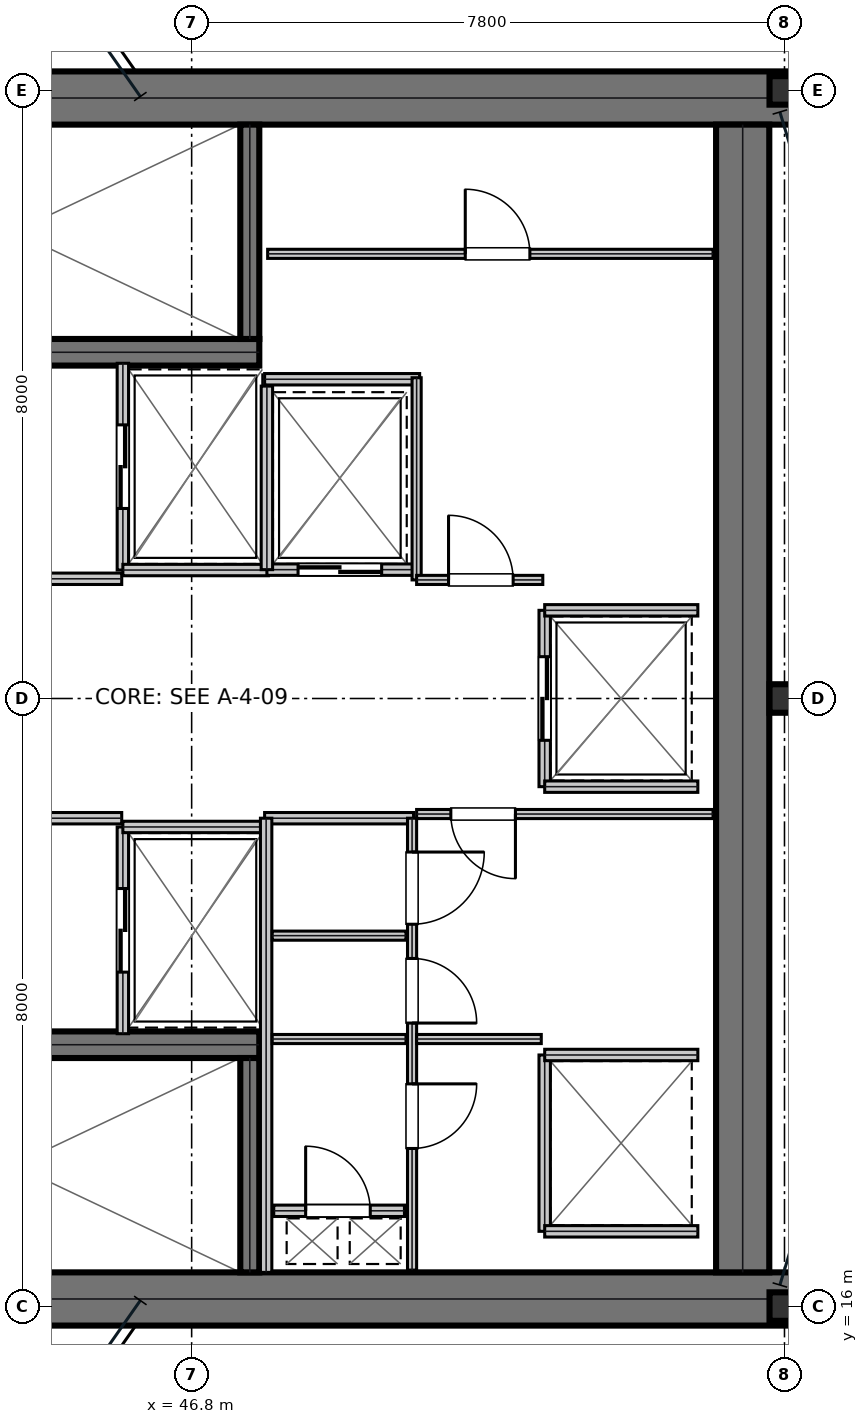
"""IFC4 building model, lengths in metres.
Left out: names, types, materials, properties, quantities, classifications, styles, units other than length and angle.
Written with IfcOpenShell. Run it as: python <this file> out.ifc"""

import sys

from ifc_helpers import new_model, si_unit, direction, frame, frame_2d, origin, origin_2d, place, context, subcontext, project, spatial, rectangle, i_section, extrude, element, fill, save


model = new_model("IFC4")
c1 = context("Model", 3, precision=1e-05, world=origin(), true_north=direction((0.0, 1.0)))
c2 = subcontext(c1, "Body", "Model", "MODEL_VIEW")
j1 = project(units=[si_unit("LENGTHUNIT", "METRE"), si_unit("PLANEANGLEUNIT", "RADIAN")], contexts=[c1])
p1 = place(None, origin())
s1 = spatial("IfcSite", under=j1, at=p1, CompositionType="ELEMENT")
p2 = place(p1, origin())
s2 = spatial("IfcBuilding", under=s1, at=p2, CompositionType="ELEMENT")
p3 = place(p2, frame((0.0, 0.0, 216.15)))
s3 = spatial("IfcBuildingStorey", under=s2, at=p3, CompositionType="ELEMENT", Elevation=216.15)
for number, where, z_axis, x_axis in (
    (1, (38.8, 31.9, 0.0), (0.0, 0.0, 1.0), (1.0, 0.0, 0.0)),
    (2, (38.8, 16.1, 0.0), (0.0, 0.0, 1.0), (1.0, 0.0, 0.0)),
):
    element("IfcWall", number, at=place(p3, frame(where, z_axis=z_axis, x_axis=x_axis)), inside=s3, PredefinedType="SHEAR", context=c2, shape_type="SweptSolid", body=[
        extrude(rectangle(XDim=16.0, YDim=0.7, at=frame_2d((8.0, 0.0))), origin(), (0.0, 0.0, 1.0), 3.79),
    ])
p4 = place(p3, frame((54.05, 16.45, 0.0), z_axis=(0.0, 0.0, 1.0), x_axis=(0.0, 1.0, 0.0)))
e3 = element("IfcWall", 3, at=p4, inside=s3, PredefinedType="SHEAR", context=c2, shape_type="SweptSolid", body=[
    extrude(rectangle(XDim=15.1, YDim=0.7, at=frame_2d((7.55, 0.0))), origin(), (0.0, 0.0, 1.0), 3.79),
])
p5 = place(p3, frame((39.98, 28.555, 0.0), z_axis=(0.0, 0.0, 1.0), x_axis=(1.0, 0.0, 0.0)))
e4 = element("IfcWall", 4, at=p5, inside=s3, PredefinedType="SHEAR", context=c2, shape_type="SweptSolid", body=[
    extrude(rectangle(XDim=7.71, YDim=0.35, at=frame_2d((3.855, 0.0))), origin(), (0.0, 0.0, 1.0), 3.79),
])
p6 = place(p5, frame((0.25, 0.0, 0.0)))
e5 = element("IfcOpeningElement", 5, at=p6, cuts=e4, PredefinedType="OPENING", context=c2, shape_type="SweptSolid", body=[
    extrude(rectangle(XDim=1.1, YDim=2.15, at=frame_2d((0.55, 1.075))), frame((0.0, 0.185, 0.0), z_axis=(0.0, -1.0, 0.0), x_axis=(1.0, 0.0, 0.0)), (0.0, 0.0, 1.0), 0.37),
])
p7 = place(p3, frame((39.98, 19.445, 0.0), z_axis=(0.0, 0.0, 1.0), x_axis=(1.0, 0.0, 0.0)))
e6 = element("IfcWall", 6, at=p7, inside=s3, PredefinedType="SHEAR", context=c2, shape_type="SweptSolid", body=[
    extrude(rectangle(XDim=7.71, YDim=0.35, at=frame_2d((3.855, 0.0))), origin(), (0.0, 0.0, 1.0), 3.79),
])
p8 = place(p7, frame((0.25, 0.0, 0.0)))
e7 = element("IfcOpeningElement", 7, at=p8, cuts=e6, PredefinedType="OPENING", context=c2, shape_type="SweptSolid", body=[
    extrude(rectangle(XDim=1.1, YDim=2.15, at=frame_2d((0.55, 1.075))), frame((0.0, 0.185, 0.0), z_axis=(0.0, -1.0, 0.0), x_axis=(1.0, 0.0, 0.0)), (0.0, 0.0, 1.0), 0.37),
])
for number, where, z_axis, x_axis in (
    (8, (47.565, 28.73, 0.0), (0.0, 0.0, 1.0), (0.0, 1.0, 0.0)),
    (9, (47.565, 16.45, 0.0), (0.0, 0.0, 1.0), (0.0, 1.0, 0.0)),
):
    element("IfcWall", number, at=place(p3, frame(where, z_axis=z_axis, x_axis=x_axis)), inside=s3, PredefinedType="SHEAR", context=c2, shape_type="SweptSolid", body=[
        extrude(rectangle(XDim=2.82, YDim=0.25, at=frame_2d((1.41, 0.0))), origin(), (0.0, 0.0, 1.0), 3.79),
    ])
for number, where, z_axis, x_axis in (
    (10, (54.6, 16.0, 0.0), (0.0, 0.0, 1.0), (1.0, 0.0, 0.0)),
    (11, (54.6, 24.0, 0.0), (0.0, 0.0, 1.0), (1.0, 0.0, 0.0)),
    (12, (54.6, 32.0, 0.0), (0.0, 0.0, 1.0), (1.0, 0.0, 0.0)),
):
    element("IfcColumn", number, at=place(p3, frame(where, z_axis=z_axis, x_axis=x_axis)), inside=s3, PredefinedType="COLUMN", context=c2, shape_type="SweptSolid", body=[
        extrude(i_section(OverallWidth=0.394, OverallDepth=0.375, WebThickness=0.017, FlangeThickness=0.028, at=origin_2d()), origin(), (0.0, 0.0, 1.0), 4.044),
    ])
p9 = place(p3, frame((39.98, 25.575, 0.0), z_axis=(0.0, 0.0, 1.0), x_axis=(1.0, 0.0, 0.0)))
e13 = element("IfcWall", 13, at=p9, inside=s3, PredefinedType="PARTITIONING", context=c2, shape_type="SweptSolid", body=[
    extrude(rectangle(XDim=5.9, YDim=0.15, at=frame_2d((2.95, 0.0))), origin(), (0.0, 0.0, 1.0), 3.79),
])
p10 = place(p9, frame((2.35, 0.0, 0.0)))
e14 = element("IfcOpeningElement", 14, at=p10, cuts=e13, PredefinedType="OPENING", context=c2, shape_type="SweptSolid", body=[
    extrude(rectangle(XDim=1.05, YDim=2.15, at=frame_2d((0.525, 1.075))), frame((0.0, 0.085, 0.0), z_axis=(0.0, -1.0, 0.0), x_axis=(1.0, 0.0, 0.0)), (0.0, 0.0, 1.0), 0.17),
])
p11 = place(p3, frame((39.98, 22.425, 0.0), z_axis=(0.0, 0.0, 1.0), x_axis=(1.0, 0.0, 0.0)))
e15 = element("IfcWall", 15, at=p11, inside=s3, PredefinedType="PARTITIONING", context=c2, shape_type="SweptSolid", body=[
    extrude(rectangle(XDim=5.9, YDim=0.15, at=frame_2d((2.95, 0.0))), origin(), (0.0, 0.0, 1.0), 3.79),
])
p12 = place(p11, frame((2.35, 0.0, 0.0)))
e16 = element("IfcOpeningElement", 16, at=p12, cuts=e15, PredefinedType="OPENING", context=c2, shape_type="SweptSolid", body=[
    extrude(rectangle(XDim=1.05, YDim=2.15, at=frame_2d((0.525, 1.075))), frame((0.0, 0.085, 0.0), z_axis=(0.0, -1.0, 0.0), x_axis=(1.0, 0.0, 0.0)), (0.0, 0.0, 1.0), 0.17),
])
p13 = place(p3, frame((45.895, 25.69, 0.0), z_axis=(0.0, 0.0, 1.0), x_axis=(0.0, 1.0, 0.0)))
e17 = element("IfcWall", 17, at=p13, inside=s3, PredefinedType="PARTITIONING", context=c2, shape_type="SweptSolid", body=[
    extrude(rectangle(XDim=2.72, YDim=0.15, at=frame_2d((1.36, 0.0))), origin(), (0.0, 0.0, 1.0), 3.79),
])
p14 = place(p13, frame((0.81, 0.0, 0.0)))
e18 = element("IfcOpeningElement", 18, at=p14, cuts=e17, PredefinedType="OPENING", context=c2, shape_type="SweptSolid", body=[
    extrude(rectangle(XDim=1.1, YDim=2.15, at=frame_2d((0.55, 1.075))), frame((0.0, 0.085, 0.0), z_axis=(0.0, -1.0, 0.0), x_axis=(1.0, 0.0, 0.0)), (0.0, 0.0, 1.0), 0.17),
])
p15 = place(p3, frame((45.895, 25.69, 0.0), z_axis=(0.0, 0.0, 1.0), x_axis=(1.0, 0.0, 0.0)))
e19 = element("IfcWall", 19, at=p15, inside=s3, PredefinedType="PARTITIONING", context=c2, shape_type="SweptSolid", body=[
    extrude(rectangle(XDim=1.915, YDim=0.15, at=frame_2d((0.958, 0.0))), origin(), (0.0, 0.0, 1.0), 3.79),
])
p16 = place(p3, frame((45.895, 19.59, 0.0), z_axis=(0.0, 0.0, 1.0), x_axis=(0.0, 1.0, 0.0)))
e20 = element("IfcWall", 20, at=p16, inside=s3, PredefinedType="PARTITIONING", context=c2, shape_type="SweptSolid", body=[
    extrude(rectangle(XDim=2.72, YDim=0.15, at=frame_2d((1.36, 0.0))), origin(), (0.0, 0.0, 1.0), 3.79),
])
p17 = place(p16, frame((0.81, 0.0, 0.0)))
e21 = element("IfcOpeningElement", 21, at=p17, cuts=e20, PredefinedType="OPENING", context=c2, shape_type="SweptSolid", body=[
    extrude(rectangle(XDim=1.1, YDim=2.15, at=frame_2d((0.55, 1.075))), frame((0.0, 0.085, 0.0), z_axis=(0.0, -1.0, 0.0), x_axis=(1.0, 0.0, 0.0)), (0.0, 0.0, 1.0), 0.17),
])
p18 = place(p3, frame((45.895, 22.31, 0.0), z_axis=(0.0, 0.0, 1.0), x_axis=(1.0, 0.0, 0.0)))
e22 = element("IfcWall", 22, at=p18, inside=s3, PredefinedType="PARTITIONING", context=c2, shape_type="SweptSolid", body=[
    extrude(rectangle(XDim=1.915, YDim=0.15, at=frame_2d((0.958, 0.0))), origin(), (0.0, 0.0, 1.0), 3.79),
])
p19 = place(p3, frame((47.79, 25.695, 0.0), z_axis=(0.0, 0.0, 1.0), x_axis=(1.0, 0.0, 0.0)))
e23 = element("IfcWall", 23, at=p19, inside=s3, PredefinedType="PARTITIONING", context=c2, shape_type="SweptSolid", body=[
    extrude(rectangle(XDim=1.92, YDim=0.15, at=frame_2d((0.96, 0.0))), origin(), (0.0, 0.0, 1.0), 3.79),
])
p20 = place(p19, frame((0.41, 0.0, 0.0)))
e24 = element("IfcOpeningElement", 24, at=p20, cuts=e23, PredefinedType="OPENING", context=c2, shape_type="SweptSolid", body=[
    extrude(rectangle(XDim=1.1, YDim=2.15, at=frame_2d((0.55, 1.075))), frame((0.0, 0.085, 0.0), z_axis=(0.0, -1.0, 0.0), x_axis=(1.0, 0.0, 0.0)), (0.0, 0.0, 1.0), 0.17),
])
p21 = place(p3, frame((47.79, 25.695, 0.0), z_axis=(0.0, 0.0, 1.0), x_axis=(0.0, 1.0, 0.0)))
e25 = element("IfcWall", 25, at=p21, inside=s3, PredefinedType="PARTITIONING", context=c2, shape_type="SweptSolid", body=[
    extrude(rectangle(XDim=2.415, YDim=0.15, at=frame_2d((1.208, 0.0))), origin(), (0.0, 0.0, 1.0), 3.79),
])
p22 = place(p3, frame((51.445, 22.84, 0.0), z_axis=(0.0, 0.0, 1.0), x_axis=(0.0, 1.0, 0.0)))
e26 = element("IfcWall", 26, at=p22, inside=s3, PredefinedType="PARTITIONING", context=c2, shape_type="SweptSolid", body=[
    extrude(rectangle(XDim=2.32, YDim=0.15, at=frame_2d((1.16, 0.0))), origin(), (0.0, 0.0, 1.0), 3.79),
])
p23 = place(p22, frame((0.61, 0.0, 0.0)))
e27 = element("IfcOpeningElement", 27, at=p23, cuts=e26, PredefinedType="OPENING", context=c2, shape_type="SweptSolid", body=[
    extrude(rectangle(XDim=1.1, YDim=2.15, at=frame_2d((0.55, 1.075))), frame((0.0, 0.085, 0.0), z_axis=(0.0, -1.0, 0.0), x_axis=(1.0, 0.0, 0.0)), (0.0, 0.0, 1.0), 0.17),
])
for number, where, z_axis, x_axis in (
    (28, (51.445, 22.84, 0.0), (0.0, 0.0, 1.0), (1.0, 0.0, 0.0)),
    (29, (51.445, 25.16, 0.0), (0.0, 0.0, 1.0), (1.0, 0.0, 0.0)),
):
    element("IfcWall", number, at=place(p3, frame(where, z_axis=z_axis, x_axis=x_axis)), inside=s3, PredefinedType="PARTITIONING", context=c2, shape_type="SweptSolid", body=[
        extrude(rectangle(XDim=2.015, YDim=0.15, at=frame_2d((1.007, 0.0))), origin(), (0.0, 0.0, 1.0), 3.79),
    ])
p24 = place(p3, frame((51.445, 16.99, 0.0), z_axis=(0.0, 0.0, 1.0), x_axis=(0.0, 1.0, 0.0)))
e30 = element("IfcWall", 30, at=p24, inside=s3, PredefinedType="PARTITIONING", context=c2, shape_type="SweptSolid", body=[
    extrude(rectangle(XDim=2.32, YDim=0.15, at=frame_2d((1.16, 0.0))), origin(), (0.0, 0.0, 1.0), 3.79),
])
for number, where, z_axis, x_axis in (
    (31, (51.445, 16.99, 0.0), (0.0, 0.0, 1.0), (1.0, 0.0, 0.0)),
    (32, (51.445, 19.31, 0.0), (0.0, 0.0, 1.0), (1.0, 0.0, 0.0)),
):
    element("IfcWall", number, at=place(p3, frame(where, z_axis=z_axis, x_axis=x_axis)), inside=s3, PredefinedType="PARTITIONING", context=c2, shape_type="SweptSolid", body=[
        extrude(rectangle(XDim=2.015, YDim=0.15, at=frame_2d((1.007, 0.0))), origin(), (0.0, 0.0, 1.0), 3.79),
    ])
p25 = place(p3, frame((47.88, 17.26, 0.0), z_axis=(0.0, 0.0, 1.0), x_axis=(1.0, 0.0, 0.0)))
e33 = element("IfcWall", 33, at=p25, inside=s3, PredefinedType="PARTITIONING", context=c2, shape_type="SweptSolid", body=[
    extrude(rectangle(XDim=1.72, YDim=0.15, at=frame_2d((0.86, 0.0))), origin(), (0.0, 0.0, 1.0), 3.79),
])
p26 = place(p25, frame((0.42, 0.0, 0.0)))
e34 = element("IfcOpeningElement", 34, at=p26, cuts=e33, PredefinedType="OPENING", context=c2, shape_type="SweptSolid", body=[
    extrude(rectangle(XDim=0.85, YDim=2.15, at=frame_2d((0.425, 1.075))), frame((0.0, 0.085, 0.0), z_axis=(0.0, -1.0, 0.0), x_axis=(1.0, 0.0, 0.0)), (0.0, 0.0, 1.0), 0.17),
])
p27 = place(p3, frame((47.76, 22.425, 0.0), z_axis=(0.0, 0.0, 1.0), x_axis=(1.0, 0.0, 0.0)))
e35 = element("IfcWall", 35, at=p27, inside=s3, PredefinedType="PARTITIONING", context=c2, shape_type="SweptSolid", body=[
    extrude(rectangle(XDim=1.96, YDim=0.15, at=frame_2d((0.98, 0.0))), origin(), (0.0, 0.0, 1.0), 3.79),
])
p28 = place(p3, frame((47.78, 16.45, 0.0), z_axis=(0.0, 0.0, 1.0), x_axis=(0.0, 1.0, 0.0)))
e36 = element("IfcWall", 36, at=p28, inside=s3, PredefinedType="PARTITIONING", context=c2, shape_type="SweptSolid", body=[
    extrude(rectangle(XDim=5.975, YDim=0.15, at=frame_2d((2.988, 0.0))), origin(), (0.0, 0.0, 1.0), 3.79),
])
for number, where, z_axis, x_axis in (
    (37, (47.86, 19.52, 0.0), (0.0, 0.0, 1.0), (1.0, 0.0, 0.0)),
    (38, (47.86, 20.88, 0.0), (0.0, 0.0, 1.0), (1.0, 0.0, 0.0)),
):
    element("IfcWall", number, at=place(p3, frame(where, z_axis=z_axis, x_axis=x_axis)), inside=s3, PredefinedType="PARTITIONING", context=c2, shape_type="SweptSolid", body=[
        extrude(rectangle(XDim=1.76, YDim=0.12, at=frame_2d((0.88, 0.0))), origin(), (0.0, 0.0, 1.0), 3.79),
    ])
p29 = place(p3, frame((49.7, 16.48, 0.0), z_axis=(0.0, 0.0, 1.0), x_axis=(0.0, 1.0, 0.0)))
e39 = element("IfcWall", 39, at=p29, inside=s3, PredefinedType="PARTITIONING", context=c2, shape_type="SweptSolid", body=[
    extrude(rectangle(XDim=5.945, YDim=0.12, at=frame_2d((2.973, 0.0))), origin(), (0.0, 0.0, 1.0), 3.79),
])
p30 = place(p29, frame((1.6, 0.0, 0.0)))
e40 = element("IfcOpeningElement", 40, at=p30, cuts=e39, PredefinedType="OPENING", context=c2, shape_type="SweptSolid", body=[
    extrude(rectangle(XDim=0.85, YDim=2.15, at=frame_2d((0.425, 1.075))), frame((0.0, 0.07, 0.0), z_axis=(0.0, -1.0, 0.0), x_axis=(1.0, 0.0, 0.0)), (0.0, 0.0, 1.0), 0.14),
])
p31 = place(p29, frame((3.25, 0.0, 0.0)))
e41 = element("IfcOpeningElement", 41, at=p31, cuts=e39, PredefinedType="OPENING", context=c2, shape_type="SweptSolid", body=[
    extrude(rectangle(XDim=0.85, YDim=2.15, at=frame_2d((0.425, 1.075))), frame((0.0, 0.07, 0.0), z_axis=(0.0, -1.0, 0.0), x_axis=(1.0, 0.0, 0.0)), (0.0, 0.0, 1.0), 0.14),
])
p32 = place(p29, frame((4.55, 0.0, 0.0)))
e42 = element("IfcOpeningElement", 42, at=p32, cuts=e39, PredefinedType="OPENING", context=c2, shape_type="SweptSolid", body=[
    extrude(rectangle(XDim=0.95, YDim=2.15, at=frame_2d((0.475, 1.075))), frame((0.0, 0.07, 0.0), z_axis=(0.0, -1.0, 0.0), x_axis=(1.0, 0.0, 0.0)), (0.0, 0.0, 1.0), 0.14),
])
p33 = place(p3, frame((49.76, 22.48, 0.0), z_axis=(0.0, 0.0, 1.0), x_axis=(1.0, 0.0, 0.0)))
e43 = element("IfcWall", 43, at=p33, inside=s3, PredefinedType="PARTITIONING", context=c2, shape_type="SweptSolid", body=[
    extrude(rectangle(XDim=3.9, YDim=0.12, at=frame_2d((1.95, 0.0))), origin(), (0.0, 0.0, 1.0), 3.79),
])
p34 = place(p33, frame((0.45, 0.0, 0.0)))
e44 = element("IfcOpeningElement", 44, at=p34, cuts=e43, PredefinedType="OPENING", context=c2, shape_type="SweptSolid", body=[
    extrude(rectangle(XDim=0.85, YDim=2.15, at=frame_2d((0.425, 1.075))), frame((0.0, 0.07, 0.0), z_axis=(0.0, -1.0, 0.0), x_axis=(1.0, 0.0, 0.0)), (0.0, 0.0, 1.0), 0.14),
])
p35 = place(p3, frame((49.76, 19.52, 0.0), z_axis=(0.0, 0.0, 1.0), x_axis=(1.0, 0.0, 0.0)))
e45 = element("IfcWall", 45, at=p35, inside=s3, PredefinedType="PARTITIONING", context=c2, shape_type="SweptSolid", body=[
    extrude(rectangle(XDim=1.64, YDim=0.12, at=frame_2d((0.82, 0.0))), origin(), (0.0, 0.0, 1.0), 3.79),
])
p36 = place(p3, frame((47.76, 28.2, 0.0), z_axis=(0.0, 0.0, 1.0), x_axis=(1.0, 0.0, 0.0)))
e46 = element("IfcWall", 46, at=p36, inside=s3, PredefinedType="PARTITIONING", context=c2, shape_type="SweptSolid", body=[
    extrude(rectangle(XDim=2.04, YDim=0.15, at=frame_2d((1.02, 0.0))), origin(), (0.0, 0.0, 1.0), 3.79),
])
p37 = place(p3, frame((49.76, 25.56, 0.0), z_axis=(0.0, 0.0, 1.0), x_axis=(0.0, 1.0, 0.0)))
e47 = element("IfcWall", 47, at=p37, inside=s3, PredefinedType="PARTITIONING", context=c2, shape_type="SweptSolid", body=[
    extrude(rectangle(XDim=2.66, YDim=0.12, at=frame_2d((1.33, 0.0))), origin(), (0.0, 0.0, 1.0), 3.79),
])
p38 = place(p3, frame((49.76, 25.56, 0.0), z_axis=(0.0, 0.0, 1.0), x_axis=(1.0, 0.0, 0.0)))
e48 = element("IfcWall", 48, at=p38, inside=s3, PredefinedType="PARTITIONING", context=c2, shape_type="SweptSolid", body=[
    extrude(rectangle(XDim=1.66, YDim=0.12, at=frame_2d((0.83, 0.0))), origin(), (0.0, 0.0, 1.0), 3.79),
])
p39 = place(p38, frame((0.42, 0.0, 0.0)))
e49 = element("IfcOpeningElement", 49, at=p39, cuts=e48, PredefinedType="OPENING", context=c2, shape_type="SweptSolid", body=[
    extrude(rectangle(XDim=0.85, YDim=2.15, at=frame_2d((0.425, 1.075))), frame((0.0, 0.07, 0.0), z_axis=(0.0, -1.0, 0.0), x_axis=(1.0, 0.0, 0.0)), (0.0, 0.0, 1.0), 0.14),
])
p40 = place(p3, frame((47.8, 29.85, 0.0), z_axis=(0.0, 0.0, 1.0), x_axis=(1.0, 0.0, 0.0)))
e50 = element("IfcWall", 50, at=p40, inside=s3, PredefinedType="PARTITIONING", context=c2, shape_type="SweptSolid", body=[
    extrude(rectangle(XDim=5.86, YDim=0.12, at=frame_2d((2.93, 0.0))), origin(), (0.0, 0.0, 1.0), 3.79),
])
p41 = place(p40, frame((2.6, 0.0, 0.0)))
e51 = element("IfcOpeningElement", 51, at=p41, cuts=e50, PredefinedType="OPENING", context=c2, shape_type="SweptSolid", body=[
    extrude(rectangle(XDim=0.85, YDim=2.15, at=frame_2d((0.425, 1.075))), frame((0.0, 0.07, 0.0), z_axis=(0.0, -1.0, 0.0), x_axis=(1.0, 0.0, 0.0)), (0.0, 0.0, 1.0), 0.14),
])
p42 = place(p14, frame((1.1, 0.0, 0.0), z_axis=(0.0, 0.0, 1.0), x_axis=(-1.0, 0.0, 0.0)))
e52 = element("IfcDoor", 52, at=p42, inside=s3, OperationType="DOUBLE_DOOR_SLIDING", PredefinedType="DOOR", context=c2, shape_type="SweptSolid", body=[
    extrude(rectangle(XDim=1.1, YDim=2.15, at=frame_2d((0.55, 1.075))), frame((0.0, 0.025, 0.0), z_axis=(0.0, -1.0, 0.0), x_axis=(1.0, 0.0, 0.0)), (0.0, 0.0, 1.0), 0.05),
])
fill(e18, e52)
p43 = place(p17, frame((1.1, 0.0, 0.0), z_axis=(0.0, 0.0, 1.0), x_axis=(-1.0, 0.0, 0.0)))
e53 = element("IfcDoor", 53, at=p43, inside=s3, OperationType="DOUBLE_DOOR_SLIDING", PredefinedType="DOOR", context=c2, shape_type="SweptSolid", body=[
    extrude(rectangle(XDim=1.1, YDim=2.15, at=frame_2d((0.55, 1.075))), frame((0.0, 0.025, 0.0), z_axis=(0.0, -1.0, 0.0), x_axis=(1.0, 0.0, 0.0)), (0.0, 0.0, 1.0), 0.05),
])
fill(e21, e53)
p44 = place(p20, frame((1.1, 0.0, 0.0), z_axis=(0.0, 0.0, 1.0), x_axis=(-1.0, 0.0, 0.0)))
e54 = element("IfcDoor", 54, at=p44, inside=s3, OperationType="DOUBLE_DOOR_SLIDING", PredefinedType="DOOR", context=c2, shape_type="SweptSolid", body=[
    extrude(rectangle(XDim=1.1, YDim=2.15, at=frame_2d((0.55, 1.075))), frame((0.0, 0.025, 0.0), z_axis=(0.0, -1.0, 0.0), x_axis=(1.0, 0.0, 0.0)), (0.0, 0.0, 1.0), 0.05),
])
fill(e24, e54)
p45 = place(p23, frame((1.1, 0.0, 0.0), z_axis=(0.0, 0.0, 1.0), x_axis=(-1.0, 0.0, 0.0)))
e55 = element("IfcDoor", 55, at=p45, inside=s3, OperationType="DOUBLE_DOOR_SLIDING", PredefinedType="DOOR", context=c2, shape_type="SweptSolid", body=[
    extrude(rectangle(XDim=1.1, YDim=2.15, at=frame_2d((0.55, 1.075))), frame((0.0, 0.025, 0.0), z_axis=(0.0, -1.0, 0.0), x_axis=(1.0, 0.0, 0.0)), (0.0, 0.0, 1.0), 0.05),
])
fill(e27, e55)
p46 = place(p26, origin())
e56 = element("IfcDoor", 56, at=p46, inside=s3, OperationType="SINGLE_SWING_LEFT", PredefinedType="TRAPDOOR", context=c2, shape_type="SweptSolid", body=[
    extrude(rectangle(XDim=0.85, YDim=2.15, at=frame_2d((0.425, 1.075))), frame((0.0, 0.025, 0.0), z_axis=(0.0, -1.0, 0.0), x_axis=(1.0, 0.0, 0.0)), (0.0, 0.0, 1.0), 0.05),
])
fill(e34, e56)
p47 = place(p30, frame((0.85, 0.0, 0.0), z_axis=(0.0, 0.0, 1.0), x_axis=(-1.0, 0.0, 0.0)))
e57 = element("IfcDoor", 57, at=p47, inside=s3, OperationType="SINGLE_SWING_LEFT", PredefinedType="DOOR", context=c2, shape_type="SweptSolid", body=[
    extrude(rectangle(XDim=0.85, YDim=2.15, at=frame_2d((0.425, 1.075))), frame((0.0, 0.025, 0.0), z_axis=(0.0, -1.0, 0.0), x_axis=(1.0, 0.0, 0.0)), (0.0, 0.0, 1.0), 0.05),
])
fill(e40, e57)
p48 = place(p31, frame((0.85, 0.0, 0.0), z_axis=(0.0, 0.0, 1.0), x_axis=(-1.0, 0.0, 0.0)))
e58 = element("IfcDoor", 58, at=p48, inside=s3, OperationType="SINGLE_SWING_RIGHT", PredefinedType="DOOR", context=c2, shape_type="SweptSolid", body=[
    extrude(rectangle(XDim=0.85, YDim=2.15, at=frame_2d((0.425, 1.075))), frame((0.0, 0.025, 0.0), z_axis=(0.0, -1.0, 0.0), x_axis=(1.0, 0.0, 0.0)), (0.0, 0.0, 1.0), 0.05),
])
fill(e41, e58)
p49 = place(p32, frame((0.95, 0.0, 0.0), z_axis=(0.0, 0.0, 1.0), x_axis=(-1.0, 0.0, 0.0)))
e59 = element("IfcDoor", 59, at=p49, inside=s3, OperationType="SINGLE_SWING_LEFT", PredefinedType="DOOR", context=c2, shape_type="SweptSolid", body=[
    extrude(rectangle(XDim=0.95, YDim=2.15, at=frame_2d((0.475, 1.075))), frame((0.0, 0.025, 0.0), z_axis=(0.0, -1.0, 0.0), x_axis=(1.0, 0.0, 0.0)), (0.0, 0.0, 1.0), 0.05),
])
fill(e42, e59)
p50 = place(p34, frame((0.85, 0.0, 0.0), z_axis=(0.0, 0.0, 1.0), x_axis=(-1.0, 0.0, 0.0)))
e60 = element("IfcDoor", 60, at=p50, inside=s3, OperationType="SINGLE_SWING_LEFT", PredefinedType="DOOR", context=c2, shape_type="SweptSolid", body=[
    extrude(rectangle(XDim=0.85, YDim=2.15, at=frame_2d((0.425, 1.075))), frame((0.0, 0.025, 0.0), z_axis=(0.0, -1.0, 0.0), x_axis=(1.0, 0.0, 0.0)), (0.0, 0.0, 1.0), 0.05),
])
fill(e44, e60)
p51 = place(p39, origin())
e61 = element("IfcDoor", 61, at=p51, inside=s3, OperationType="SINGLE_SWING_LEFT", PredefinedType="DOOR", context=c2, shape_type="SweptSolid", body=[
    extrude(rectangle(XDim=0.85, YDim=2.15, at=frame_2d((0.425, 1.075))), frame((0.0, 0.025, 0.0), z_axis=(0.0, -1.0, 0.0), x_axis=(1.0, 0.0, 0.0)), (0.0, 0.0, 1.0), 0.05),
])
fill(e49, e61)
p52 = place(p41, origin())
e62 = element("IfcDoor", 62, at=p52, inside=s3, OperationType="SINGLE_SWING_LEFT", PredefinedType="DOOR", context=c2, shape_type="SweptSolid", body=[
    extrude(rectangle(XDim=0.85, YDim=2.15, at=frame_2d((0.425, 1.075))), frame((0.0, 0.025, 0.0), z_axis=(0.0, -1.0, 0.0), x_axis=(1.0, 0.0, 0.0)), (0.0, 0.0, 1.0), 0.05),
])
fill(e51, e62)
save(model, sys.argv[1])
